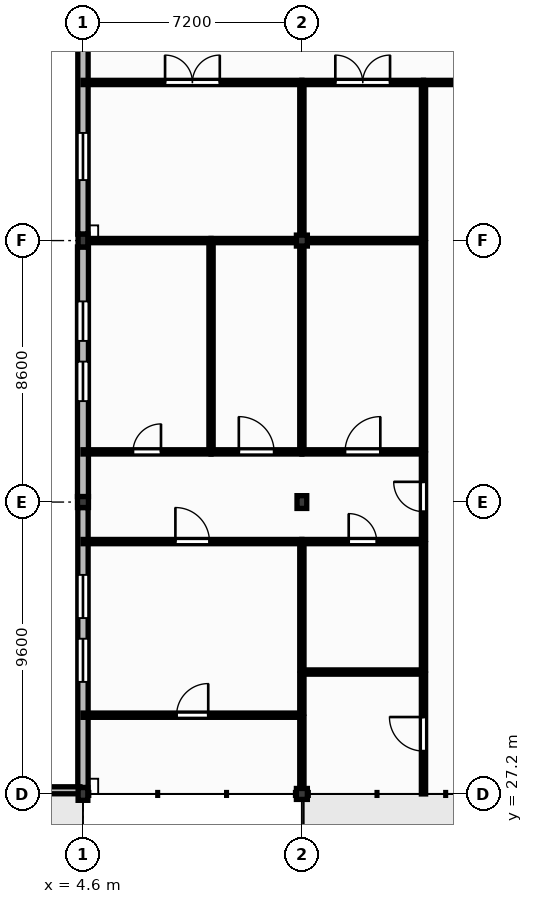
"""IFC4 building model, lengths in metres.
Left out: names, types, materials, properties, quantities, classifications, styles, units other than length and angle.
Written with IfcOpenShell. Run it as: python <this file> out.ifc"""

import sys

from ifc_helpers import new_model, si_unit, direction, frame, frame_2d, origin, origin_2d, place, context, subcontext, project, spatial, rectangle, extrude, element, fill, save


model = new_model("IFC4")
c1 = context("Model", 3, precision=1e-05, world=origin(), true_north=direction((0.0, 1.0)))
c2 = subcontext(c1, "Body", "Model", "MODEL_VIEW")
j1 = project(units=[si_unit("LENGTHUNIT", "METRE"), si_unit("PLANEANGLEUNIT", "RADIAN")], contexts=[c1])
p1 = place(None, origin())
s1 = spatial("IfcSite", under=j1, at=p1, CompositionType="ELEMENT")
p2 = place(p1, origin())
s2 = spatial("IfcBuilding", under=s1, at=p2, CompositionType="ELEMENT")
p3 = place(p2, frame((0.0, 0.0, 4.5)))
s3 = spatial("IfcBuildingStorey", under=s2, at=p3, CompositionType="ELEMENT", Elevation=4.5)
p4 = place(p3, frame((4.6, 27.2, 0.0), z_axis=(0.0, 0.0, 1.0), x_axis=(1.0, 0.0, 0.0)))
e1 = element("IfcColumn", 1, at=p4, inside=s3, PredefinedType="COLUMN", context=c2, shape_type="SweptSolid", body=[
    extrude(rectangle(XDim=0.32, YDim=0.42, at=origin_2d()), origin(), (0.0, 0.0, 1.0), 4.26),
])
p5 = place(p3, frame((4.6, 36.8, 0.0), z_axis=(0.0, 0.0, 1.0), x_axis=(1.0, 0.0, 0.0)))
e2 = element("IfcColumn", 2, at=p5, inside=s3, PredefinedType="COLUMN", context=c2, shape_type="SweptSolid", body=[
    extrude(rectangle(XDim=0.36, YDim=0.36, at=origin_2d()), origin(), (0.0, 0.0, 1.0), 4.26),
])
p6 = place(p3, frame((4.6, 45.4, 0.0), z_axis=(0.0, 0.0, 1.0), x_axis=(1.0, 0.0, 0.0)))
e3 = element("IfcColumn", 3, at=p6, inside=s3, PredefinedType="COLUMN", context=c2, shape_type="SweptSolid", body=[
    extrude(rectangle(XDim=0.32, YDim=0.42, at=origin_2d()), origin(), (0.0, 0.0, 1.0), 4.26),
])
p7 = place(p3, frame((11.8, 27.2, 0.0), z_axis=(0.0, 0.0, 1.0), x_axis=(1.0, 0.0, 0.0)))
e4 = element("IfcColumn", 4, at=p7, inside=s3, PredefinedType="COLUMN", context=c2, shape_type="SweptSolid", body=[
    extrude(rectangle(XDim=0.36, YDim=0.36, at=origin_2d()), origin(), (0.0, 0.0, 1.0), 4.26),
])
p8 = place(p3, frame((11.8, 36.8, 0.0), z_axis=(0.0, 0.0, 1.0), x_axis=(1.0, 0.0, 0.0)))
e5 = element("IfcColumn", 5, at=p8, inside=s3, PredefinedType="COLUMN", context=c2, shape_type="SweptSolid", body=[
    extrude(rectangle(XDim=0.32, YDim=0.42, at=origin_2d()), origin(), (0.0, 0.0, 1.0), 4.26),
])
p9 = place(p3, frame((11.8, 45.4, 0.0), z_axis=(0.0, 0.0, 1.0), x_axis=(1.0, 0.0, 0.0)))
e6 = element("IfcColumn", 6, at=p9, inside=s3, PredefinedType="COLUMN", context=c2, shape_type="SweptSolid", body=[
    extrude(rectangle(XDim=0.36, YDim=0.36, at=origin_2d()), origin(), (0.0, 0.0, 1.0), 4.26),
])
p10 = place(p3, frame((4.6, 27.41, 0.0), z_axis=(0.0, 0.0, 1.0), x_axis=(0.0, 1.0, 0.0)))
e7 = element("IfcWall", 7, at=p10, inside=s3, PredefinedType="SOLIDWALL", context=c2, shape_type="SweptSolid", body=[
    extrude(rectangle(XDim=9.21, YDim=0.34, at=frame_2d((4.605, 0.0))), origin(), (0.0, 0.0, 1.0), 3.8),
])
p11 = place(p10, frame((3.475, 0.0, 0.9)))
e8 = element("IfcOpeningElement", 8, at=p11, cuts=e7, PredefinedType="OPENING", context=c2, shape_type="SweptSolid", body=[
    extrude(rectangle(XDim=1.42, YDim=2.4, at=frame_2d((0.71, 1.2))), frame((0.0, 0.18, 0.0), z_axis=(0.0, -1.0, 0.0), x_axis=(1.0, 0.0, 0.0)), (0.0, 0.0, 1.0), 0.36),
])
p12 = place(p10, frame((5.575, 0.0, 0.9)))
e9 = element("IfcOpeningElement", 9, at=p12, cuts=e7, PredefinedType="OPENING", context=c2, shape_type="SweptSolid", body=[
    extrude(rectangle(XDim=1.42, YDim=2.4, at=frame_2d((0.71, 1.2))), frame((0.0, 0.18, 0.0), z_axis=(0.0, -1.0, 0.0), x_axis=(1.0, 0.0, 0.0)), (0.0, 0.0, 1.0), 0.36),
])
p13 = place(p3, frame((4.6, 36.98, 0.0), z_axis=(0.0, 0.0, 1.0), x_axis=(0.0, 1.0, 0.0)))
e10 = element("IfcWall", 10, at=p13, inside=s3, PredefinedType="SOLIDWALL", context=c2, shape_type="SweptSolid", body=[
    extrude(rectangle(XDim=8.21, YDim=0.36, at=frame_2d((4.105, 0.0))), origin(), (0.0, 0.0, 1.0), 3.8),
])
p14 = place(p13, frame((3.14, 0.0, 0.9)))
e11 = element("IfcOpeningElement", 11, at=p14, cuts=e10, PredefinedType="OPENING", context=c2, shape_type="SweptSolid", body=[
    extrude(rectangle(XDim=1.3, YDim=2.4, at=frame_2d((0.65, 1.2))), frame((0.0, 0.19, 0.0), z_axis=(0.0, -1.0, 0.0), x_axis=(1.0, 0.0, 0.0)), (0.0, 0.0, 1.0), 0.38),
])
p15 = place(p13, frame((5.12, 0.0, 0.9)))
e12 = element("IfcOpeningElement", 12, at=p15, cuts=e10, PredefinedType="OPENING", context=c2, shape_type="SweptSolid", body=[
    extrude(rectangle(XDim=1.3, YDim=2.4, at=frame_2d((0.65, 1.2))), frame((0.0, 0.19, 0.0), z_axis=(0.0, -1.0, 0.0), x_axis=(1.0, 0.0, 0.0)), (0.0, 0.0, 1.0), 0.38),
])
p16 = place(p3, frame((4.6, 45.61, 0.0), z_axis=(0.0, 0.0, 1.0), x_axis=(0.0, 1.0, 0.0)))
e13 = element("IfcWall", 13, at=p16, inside=s3, PredefinedType="SOLIDWALL", context=c2, shape_type="SweptSolid", body=[
    extrude(rectangle(XDim=6.81, YDim=0.34, at=frame_2d((3.405, 0.0))), origin(), (0.0, 0.0, 1.0), 3.8),
])
p17 = place(p16, frame((1.78, 0.0, 0.9)))
e14 = element("IfcOpeningElement", 14, at=p17, cuts=e13, PredefinedType="OPENING", context=c2, shape_type="SweptSolid", body=[
    extrude(rectangle(XDim=1.55, YDim=2.4, at=frame_2d((0.775, 1.2))), frame((0.0, 0.18, 0.0), z_axis=(0.0, -1.0, 0.0), x_axis=(1.0, 0.0, 0.0)), (0.0, 0.0, 1.0), 0.36),
])
p18 = place(p3, frame((2.78, 27.32, -0.05), z_axis=(0.0, 0.0, 1.0), x_axis=(1.0, 0.0, 0.0)))
e15 = element("IfcWall", 15, at=p18, inside=s3, PredefinedType="PARAPET", context=c2, shape_type="SweptSolid", body=[
    extrude(rectangle(XDim=1.72, YDim=0.23, at=frame_2d((0.86, 0.0))), origin(), (0.0, 0.0, 1.0), 0.7),
])
p19 = place(p3, frame((4.6, 29.79, 0.0), z_axis=(0.0, 0.0, 1.0), x_axis=(1.0, 0.0, 0.0)))
e16 = element("IfcWall", 16, at=p19, inside=s3, PredefinedType="PARTITIONING", context=c2, shape_type="SweptSolid", body=[
    extrude(rectangle(XDim=7.2, YDim=0.14, at=frame_2d((3.6, 0.0))), origin(), (0.0, 0.0, 1.0), 4.18),
])
p20 = place(p19, frame((3.08, 0.0, 0.0)))
e17 = element("IfcOpeningElement", 17, at=p20, cuts=e16, PredefinedType="OPENING", context=c2, shape_type="SweptSolid", body=[
    extrude(rectangle(XDim=1.04, YDim=2.1, at=frame_2d((0.52, 1.05))), frame((0.0, 0.08, 0.0), z_axis=(0.0, -1.0, 0.0), x_axis=(1.0, 0.0, 0.0)), (0.0, 0.0, 1.0), 0.16),
])
p21 = place(p3, frame((4.6, 35.5, 0.0), z_axis=(0.0, 0.0, 1.0), x_axis=(1.0, 0.0, 0.0)))
e18 = element("IfcWall", 18, at=p21, inside=s3, PredefinedType="PARTITIONING", context=c2, shape_type="SweptSolid", body=[
    extrude(rectangle(XDim=7.2, YDim=0.14, at=frame_2d((3.6, 0.0))), origin(), (0.0, 0.0, 1.0), 4.18),
])
p22 = place(p21, frame((3.04, 0.0, 0.0)))
e19 = element("IfcOpeningElement", 19, at=p22, cuts=e18, PredefinedType="OPENING", context=c2, shape_type="SweptSolid", body=[
    extrude(rectangle(XDim=1.12, YDim=2.15, at=frame_2d((0.56, 1.075))), frame((0.0, 0.08, 0.0), z_axis=(0.0, -1.0, 0.0), x_axis=(1.0, 0.0, 0.0)), (0.0, 0.0, 1.0), 0.16),
])
p23 = place(p3, frame((4.6, 38.45, 0.0), z_axis=(0.0, 0.0, 1.0), x_axis=(1.0, 0.0, 0.0)))
e20 = element("IfcWall", 20, at=p23, inside=s3, PredefinedType="PARTITIONING", context=c2, shape_type="SweptSolid", body=[
    extrude(rectangle(XDim=4.212, YDim=0.14, at=frame_2d((2.106, 0.0))), origin(), (0.0, 0.0, 1.0), 4.18),
])
p24 = place(p23, frame((1.646, 0.0, 0.0)))
e21 = element("IfcOpeningElement", 21, at=p24, cuts=e20, PredefinedType="OPENING", context=c2, shape_type="SweptSolid", body=[
    extrude(rectangle(XDim=0.92, YDim=2.1, at=frame_2d((0.46, 1.05))), frame((0.0, 0.08, 0.0), z_axis=(0.0, -1.0, 0.0), x_axis=(1.0, 0.0, 0.0)), (0.0, 0.0, 1.0), 0.16),
])
p25 = place(p3, frame((4.76, 45.4, 0.0), z_axis=(0.0, 0.0, 1.0), x_axis=(1.0, 0.0, 0.0)))
e22 = element("IfcWall", 22, at=p25, inside=s3, PredefinedType="PARTITIONING", context=c2, shape_type="SweptSolid", body=[
    extrude(rectangle(XDim=4.052, YDim=0.14, at=frame_2d((2.026, 0.0))), origin(), (0.0, 0.0, 1.0), 3.66),
])
p26 = place(p3, frame((4.6, 50.6, 0.0), z_axis=(0.0, 0.0, 1.0), x_axis=(1.0, 0.0, 0.0)))
e23 = element("IfcWall", 23, at=p26, inside=s3, PredefinedType="PARTITIONING", context=c2, shape_type="SweptSolid", body=[
    extrude(rectangle(XDim=7.2, YDim=0.14, at=frame_2d((3.6, 0.0))), origin(), (0.0, 0.0, 1.0), 4.18),
])
p27 = place(p26, frame((2.7, 0.0, 0.0)))
e24 = element("IfcOpeningElement", 24, at=p27, cuts=e23, PredefinedType="OPENING", context=c2, shape_type="SweptSolid", body=[
    extrude(rectangle(XDim=1.8, YDim=2.3, at=frame_2d((0.9, 1.15))), frame((0.0, 0.08, 0.0), z_axis=(0.0, -1.0, 0.0), x_axis=(1.0, 0.0, 0.0)), (0.0, 0.0, 1.0), 0.16),
])
p28 = place(p3, frame((8.812, 38.52, 0.0), z_axis=(0.0, 0.0, 1.0), x_axis=(0.0, 1.0, 0.0)))
e25 = element("IfcWall", 25, at=p28, inside=s3, PredefinedType="PARTITIONING", context=c2, shape_type="SweptSolid", body=[
    extrude(rectangle(XDim=6.81, YDim=0.14, at=frame_2d((3.405, 0.0))), origin(), (0.0, 0.0, 1.0), 4.18),
])
p29 = place(p3, frame((8.812, 38.45, 0.0), z_axis=(0.0, 0.0, 1.0), x_axis=(1.0, 0.0, 0.0)))
e26 = element("IfcWall", 26, at=p29, inside=s3, PredefinedType="PARTITIONING", context=c2, shape_type="SweptSolid", body=[
    extrude(rectangle(XDim=2.988, YDim=0.14, at=frame_2d((1.494, 0.0))), origin(), (0.0, 0.0, 1.0), 4.18),
])
p30 = place(p29, frame((0.914, 0.0, 0.0)))
e27 = element("IfcOpeningElement", 27, at=p30, cuts=e26, PredefinedType="OPENING", context=c2, shape_type="SweptSolid", body=[
    extrude(rectangle(XDim=1.16, YDim=2.1, at=frame_2d((0.58, 1.05))), frame((0.0, 0.08, 0.0), z_axis=(0.0, -1.0, 0.0), x_axis=(1.0, 0.0, 0.0)), (0.0, 0.0, 1.0), 0.16),
])
p31 = place(p3, frame((8.812, 45.4, 0.0), z_axis=(0.0, 0.0, 1.0), x_axis=(1.0, 0.0, 0.0)))
e28 = element("IfcWall", 28, at=p31, inside=s3, PredefinedType="PARTITIONING", context=c2, shape_type="SweptSolid", body=[
    extrude(rectangle(XDim=2.808, YDim=0.14, at=frame_2d((1.404, 0.0))), origin(), (0.0, 0.0, 1.0), 3.66),
])
p32 = place(p3, frame((11.8, 27.38, 0.0), z_axis=(0.0, 0.0, 1.0), x_axis=(0.0, 1.0, 0.0)))
e29 = element("IfcWall", 29, at=p32, inside=s3, PredefinedType="PARTITIONING", context=c2, shape_type="SweptSolid", body=[
    extrude(rectangle(XDim=2.34, YDim=0.14, at=frame_2d((1.17, 0.0))), origin(), (0.0, 0.0, 1.0), 3.62),
])
p33 = place(p3, frame((11.8, 29.86, 0.0), z_axis=(0.0, 0.0, 1.0), x_axis=(0.0, 1.0, 0.0)))
e30 = element("IfcWall", 30, at=p33, inside=s3, PredefinedType="PARTITIONING", context=c2, shape_type="SweptSolid", body=[
    extrude(rectangle(XDim=1.279, YDim=0.14, at=frame_2d((0.639, 0.0))), origin(), (0.0, 0.0, 1.0), 3.62),
])
p34 = place(p3, frame((11.8, 31.279, 0.0), z_axis=(0.0, 0.0, 1.0), x_axis=(0.0, 1.0, 0.0)))
e31 = element("IfcWall", 31, at=p34, inside=s3, PredefinedType="PARTITIONING", context=c2, shape_type="SweptSolid", body=[
    extrude(rectangle(XDim=4.151, YDim=0.14, at=frame_2d((2.075, 0.0))), origin(), (0.0, 0.0, 1.0), 3.62),
])
p35 = place(p3, frame((11.8, 31.209, 0.0), z_axis=(0.0, 0.0, 1.0), x_axis=(1.0, 0.0, 0.0)))
e32 = element("IfcWall", 32, at=p35, inside=s3, PredefinedType="PARTITIONING", context=c2, shape_type="SweptSolid", body=[
    extrude(rectangle(XDim=4.0, YDim=0.14, at=frame_2d((2.0, 0.0))), origin(), (0.0, 0.0, 1.0), 4.18),
])
p36 = place(p3, frame((11.8, 35.5, 0.0), z_axis=(0.0, 0.0, 1.0), x_axis=(1.0, 0.0, 0.0)))
e33 = element("IfcWall", 33, at=p36, inside=s3, PredefinedType="PARTITIONING", context=c2, shape_type="SweptSolid", body=[
    extrude(rectangle(XDim=4.0, YDim=0.14, at=frame_2d((2.0, 0.0))), origin(), (0.0, 0.0, 1.0), 4.18),
])
p37 = place(p36, frame((1.54, 0.0, 0.0)))
e34 = element("IfcOpeningElement", 34, at=p37, cuts=e33, PredefinedType="OPENING", context=c2, shape_type="SweptSolid", body=[
    extrude(rectangle(XDim=0.92, YDim=2.1, at=frame_2d((0.46, 1.05))), frame((0.0, 0.08, 0.0), z_axis=(0.0, -1.0, 0.0), x_axis=(1.0, 0.0, 0.0)), (0.0, 0.0, 1.0), 0.16),
])
p38 = place(p3, frame((11.8, 38.52, 0.0), z_axis=(0.0, 0.0, 1.0), x_axis=(0.0, 1.0, 0.0)))
e35 = element("IfcWall", 35, at=p38, inside=s3, PredefinedType="PARTITIONING", context=c2, shape_type="SweptSolid", body=[
    extrude(rectangle(XDim=6.7, YDim=0.14, at=frame_2d((3.35, 0.0))), origin(), (0.0, 0.0, 1.0), 3.62),
])
p39 = place(p3, frame((11.8, 38.45, 0.0), z_axis=(0.0, 0.0, 1.0), x_axis=(1.0, 0.0, 0.0)))
e36 = element("IfcWall", 36, at=p39, inside=s3, PredefinedType="PARTITIONING", context=c2, shape_type="SweptSolid", body=[
    extrude(rectangle(XDim=4.0, YDim=0.14, at=frame_2d((2.0, 0.0))), origin(), (0.0, 0.0, 1.0), 4.18),
])
p40 = place(p39, frame((1.42, 0.0, 0.0)))
e37 = element("IfcOpeningElement", 37, at=p40, cuts=e36, PredefinedType="OPENING", context=c2, shape_type="SweptSolid", body=[
    extrude(rectangle(XDim=1.16, YDim=2.1, at=frame_2d((0.58, 1.05))), frame((0.0, 0.08, 0.0), z_axis=(0.0, -1.0, 0.0), x_axis=(1.0, 0.0, 0.0)), (0.0, 0.0, 1.0), 0.16),
])
p41 = place(p3, frame((11.8, 45.58, 0.0), z_axis=(0.0, 0.0, 1.0), x_axis=(0.0, 1.0, 0.0)))
e38 = element("IfcWall", 38, at=p41, inside=s3, PredefinedType="PARTITIONING", context=c2, shape_type="SweptSolid", body=[
    extrude(rectangle(XDim=4.95, YDim=0.14, at=frame_2d((2.475, 0.0))), origin(), (0.0, 0.0, 1.0), 3.74),
])
p42 = place(p3, frame((11.98, 45.4, 0.0), z_axis=(0.0, 0.0, 1.0), x_axis=(1.0, 0.0, 0.0)))
e39 = element("IfcWall", 39, at=p42, inside=s3, PredefinedType="PARTITIONING", context=c2, shape_type="SweptSolid", body=[
    extrude(rectangle(XDim=3.82, YDim=0.14, at=frame_2d((1.91, 0.0))), origin(), (0.0, 0.0, 1.0), 3.62),
])
p43 = place(p3, frame((11.8, 50.6, 0.0), z_axis=(0.0, 0.0, 1.0), x_axis=(1.0, 0.0, 0.0)))
e40 = element("IfcWall", 40, at=p43, inside=s3, PredefinedType="PARTITIONING", context=c2, shape_type="SweptSolid", body=[
    extrude(rectangle(XDim=4.0, YDim=0.14, at=frame_2d((2.0, 0.0))), origin(), (0.0, 0.0, 1.0), 4.18),
])
p44 = place(p43, frame((1.1, 0.0, 0.0)))
e41 = element("IfcOpeningElement", 41, at=p44, cuts=e40, PredefinedType="OPENING", context=c2, shape_type="SweptSolid", body=[
    extrude(rectangle(XDim=1.8, YDim=2.3, at=frame_2d((0.9, 1.15))), frame((0.0, 0.08, 0.0), z_axis=(0.0, -1.0, 0.0), x_axis=(1.0, 0.0, 0.0)), (0.0, 0.0, 1.0), 0.16),
])
p45 = place(p3, frame((15.8, 27.2, 0.0), z_axis=(0.0, 0.0, 1.0), x_axis=(0.0, 1.0, 0.0)))
e42 = element("IfcWall", 42, at=p45, inside=s3, PredefinedType="PARTITIONING", context=c2, shape_type="SweptSolid", body=[
    extrude(rectangle(XDim=3.939, YDim=0.14, at=frame_2d((1.969, 0.0))), origin(), (0.0, 0.0, 1.0), 4.18),
])
p46 = place(p45, frame((1.409, 0.0, 0.0)))
e43 = element("IfcOpeningElement", 43, at=p46, cuts=e42, PredefinedType="OPENING", context=c2, shape_type="SweptSolid", body=[
    extrude(rectangle(XDim=1.12, YDim=2.15, at=frame_2d((0.56, 1.075))), frame((0.0, 0.08, 0.0), z_axis=(0.0, -1.0, 0.0), x_axis=(1.0, 0.0, 0.0)), (0.0, 0.0, 1.0), 0.16),
])
p47 = place(p3, frame((15.8, 31.279, 0.0), z_axis=(0.0, 0.0, 1.0), x_axis=(0.0, 1.0, 0.0)))
e44 = element("IfcWall", 44, at=p47, inside=s3, PredefinedType="PARTITIONING", context=c2, shape_type="SweptSolid", body=[
    extrude(rectangle(XDim=4.151, YDim=0.14, at=frame_2d((2.075, 0.0))), origin(), (0.0, 0.0, 1.0), 4.18),
])
p48 = place(p3, frame((15.8, 35.57, 0.0), z_axis=(0.0, 0.0, 1.0), x_axis=(0.0, 1.0, 0.0)))
e45 = element("IfcWall", 45, at=p48, inside=s3, PredefinedType="PARTITIONING", context=c2, shape_type="SweptSolid", body=[
    extrude(rectangle(XDim=2.81, YDim=0.14, at=frame_2d((1.405, 0.0))), origin(), (0.0, 0.0, 1.0), 4.18),
])
p49 = place(p48, frame((0.915, 0.0, 0.0)))
e46 = element("IfcOpeningElement", 46, at=p49, cuts=e45, PredefinedType="OPENING", context=c2, shape_type="SweptSolid", body=[
    extrude(rectangle(XDim=0.98, YDim=2.15, at=frame_2d((0.49, 1.075))), frame((0.0, 0.08, 0.0), z_axis=(0.0, -1.0, 0.0), x_axis=(1.0, 0.0, 0.0)), (0.0, 0.0, 1.0), 0.16),
])
p50 = place(p3, frame((15.8, 38.52, 0.0), z_axis=(0.0, 0.0, 1.0), x_axis=(0.0, 1.0, 0.0)))
e47 = element("IfcWall", 47, at=p50, inside=s3, PredefinedType="PARTITIONING", context=c2, shape_type="SweptSolid", body=[
    extrude(rectangle(XDim=6.81, YDim=0.14, at=frame_2d((3.405, 0.0))), origin(), (0.0, 0.0, 1.0), 4.18),
])
p51 = place(p3, frame((15.8, 45.47, 0.0), z_axis=(0.0, 0.0, 1.0), x_axis=(0.0, 1.0, 0.0)))
e48 = element("IfcWall", 48, at=p51, inside=s3, PredefinedType="PARTITIONING", context=c2, shape_type="SweptSolid", body=[
    extrude(rectangle(XDim=5.06, YDim=0.14, at=frame_2d((2.53, 0.0))), origin(), (0.0, 0.0, 1.0), 4.18),
])
p52 = place(p3, frame((15.8, 50.6, 0.0), z_axis=(0.0, 0.0, 1.0), x_axis=(1.0, 0.0, 0.0)))
e49 = element("IfcWall", 49, at=p52, inside=s3, PredefinedType="PARTITIONING", context=c2, shape_type="SweptSolid", body=[
    extrude(rectangle(XDim=3.2, YDim=0.14, at=frame_2d((1.6, 0.0))), origin(), (0.0, 0.0, 1.0), 4.18),
])
p53 = place(p52, frame((1.08, 0.0, 0.0)))
e50 = element("IfcOpeningElement", 50, at=p53, cuts=e49, PredefinedType="OPENING", context=c2, shape_type="SweptSolid", body=[
    extrude(rectangle(XDim=1.04, YDim=2.1, at=frame_2d((0.52, 1.05))), frame((0.0, 0.08, 0.0), z_axis=(0.0, -1.0, 0.0), x_axis=(1.0, 0.0, 0.0)), (0.0, 0.0, 1.0), 0.16),
])
p54 = place(p11, origin())
e51 = element("IfcWindow", 51, at=p54, inside=s3, PartitioningType="SINGLE_PANEL", PredefinedType="WINDOW", context=c2, shape_type="SweptSolid", body=[
    extrude(rectangle(XDim=1.42, YDim=2.4, at=frame_2d((0.71, 1.2))), frame((0.0, 0.03, 0.0), z_axis=(0.0, -1.0, 0.0), x_axis=(1.0, 0.0, 0.0)), (0.0, 0.0, 1.0), 0.06),
])
fill(e8, e51)
p55 = place(p12, origin())
e52 = element("IfcWindow", 52, at=p55, inside=s3, PartitioningType="SINGLE_PANEL", PredefinedType="WINDOW", context=c2, shape_type="SweptSolid", body=[
    extrude(rectangle(XDim=1.42, YDim=2.4, at=frame_2d((0.71, 1.2))), frame((0.0, 0.03, 0.0), z_axis=(0.0, -1.0, 0.0), x_axis=(1.0, 0.0, 0.0)), (0.0, 0.0, 1.0), 0.06),
])
fill(e9, e52)
p56 = place(p14, origin())
e53 = element("IfcWindow", 53, at=p56, inside=s3, PartitioningType="SINGLE_PANEL", PredefinedType="WINDOW", context=c2, shape_type="SweptSolid", body=[
    extrude(rectangle(XDim=1.3, YDim=2.4, at=frame_2d((0.65, 1.2))), frame((0.0, 0.03, 0.0), z_axis=(0.0, -1.0, 0.0), x_axis=(1.0, 0.0, 0.0)), (0.0, 0.0, 1.0), 0.06),
])
fill(e11, e53)
p57 = place(p15, origin())
e54 = element("IfcWindow", 54, at=p57, inside=s3, PartitioningType="SINGLE_PANEL", PredefinedType="WINDOW", context=c2, shape_type="SweptSolid", body=[
    extrude(rectangle(XDim=1.3, YDim=2.4, at=frame_2d((0.65, 1.2))), frame((0.0, 0.03, 0.0), z_axis=(0.0, -1.0, 0.0), x_axis=(1.0, 0.0, 0.0)), (0.0, 0.0, 1.0), 0.06),
])
fill(e12, e54)
p58 = place(p17, origin())
e55 = element("IfcWindow", 55, at=p58, inside=s3, PartitioningType="DOUBLE_PANEL_VERTICAL", PredefinedType="WINDOW", context=c2, shape_type="SweptSolid", body=[
    extrude(rectangle(XDim=1.55, YDim=2.4, at=frame_2d((0.775, 1.2))), frame((0.0, 0.03, 0.0), z_axis=(0.0, -1.0, 0.0), x_axis=(1.0, 0.0, 0.0)), (0.0, 0.0, 1.0), 0.06),
])
fill(e14, e55)
p59 = place(p49, origin())
e56 = element("IfcDoor", 56, at=p59, inside=s3, OperationType="SINGLE_SWING_RIGHT", PredefinedType="DOOR", context=c2, shape_type="SweptSolid", body=[
    extrude(rectangle(XDim=0.98, YDim=2.15, at=frame_2d((0.49, 1.075))), frame((0.0, 0.025, 0.0), z_axis=(0.0, -1.0, 0.0), x_axis=(1.0, 0.0, 0.0)), (0.0, 0.0, 1.0), 0.05),
])
fill(e46, e56)
p60 = place(p22, origin())
e57 = element("IfcDoor", 57, at=p60, inside=s3, OperationType="SINGLE_SWING_LEFT", PredefinedType="DOOR", context=c2, shape_type="SweptSolid", body=[
    extrude(rectangle(XDim=1.12, YDim=2.15, at=frame_2d((0.56, 1.075))), frame((0.0, 0.025, 0.0), z_axis=(0.0, -1.0, 0.0), x_axis=(1.0, 0.0, 0.0)), (0.0, 0.0, 1.0), 0.05),
])
fill(e19, e57)
p61 = place(p24, origin())
e58 = element("IfcDoor", 58, at=p61, inside=s3, OperationType="SINGLE_SWING_RIGHT", PredefinedType="DOOR", context=c2, shape_type="SweptSolid", body=[
    extrude(rectangle(XDim=0.92, YDim=2.1, at=frame_2d((0.46, 1.05))), frame((0.0, 0.025, 0.0), z_axis=(0.0, -1.0, 0.0), x_axis=(1.0, 0.0, 0.0)), (0.0, 0.0, 1.0), 0.05),
])
fill(e21, e58)
p62 = place(p30, origin())
e59 = element("IfcDoor", 59, at=p62, inside=s3, OperationType="SINGLE_SWING_LEFT", PredefinedType="DOOR", context=c2, shape_type="SweptSolid", body=[
    extrude(rectangle(XDim=1.16, YDim=2.1, at=frame_2d((0.58, 1.05))), frame((0.0, 0.025, 0.0), z_axis=(0.0, -1.0, 0.0), x_axis=(1.0, 0.0, 0.0)), (0.0, 0.0, 1.0), 0.05),
])
fill(e27, e59)
p63 = place(p27, origin())
e60 = element("IfcDoor", 60, at=p63, inside=s3, OperationType="DOUBLE_DOOR_SINGLE_SWING", PredefinedType="DOOR", context=c2, shape_type="SweptSolid", body=[
    extrude(rectangle(XDim=1.8, YDim=2.3, at=frame_2d((0.9, 1.15))), frame((0.0, 0.025, 0.0), z_axis=(0.0, -1.0, 0.0), x_axis=(1.0, 0.0, 0.0)), (0.0, 0.0, 1.0), 0.05),
])
fill(e24, e60)
p64 = place(p46, origin())
e61 = element("IfcDoor", 61, at=p64, inside=s3, OperationType="SINGLE_SWING_RIGHT", PredefinedType="DOOR", context=c2, shape_type="SweptSolid", body=[
    extrude(rectangle(XDim=1.12, YDim=2.15, at=frame_2d((0.56, 1.075))), frame((0.0, 0.025, 0.0), z_axis=(0.0, -1.0, 0.0), x_axis=(1.0, 0.0, 0.0)), (0.0, 0.0, 1.0), 0.05),
])
fill(e43, e61)
p65 = place(p37, origin())
e62 = element("IfcDoor", 62, at=p65, inside=s3, OperationType="SINGLE_SWING_LEFT", PredefinedType="DOOR", context=c2, shape_type="SweptSolid", body=[
    extrude(rectangle(XDim=0.92, YDim=2.1, at=frame_2d((0.46, 1.05))), frame((0.0, 0.025, 0.0), z_axis=(0.0, -1.0, 0.0), x_axis=(1.0, 0.0, 0.0)), (0.0, 0.0, 1.0), 0.05),
])
fill(e34, e62)
p66 = place(p40, origin())
e63 = element("IfcDoor", 63, at=p66, inside=s3, OperationType="SINGLE_SWING_RIGHT", PredefinedType="DOOR", context=c2, shape_type="SweptSolid", body=[
    extrude(rectangle(XDim=1.16, YDim=2.1, at=frame_2d((0.58, 1.05))), frame((0.0, 0.025, 0.0), z_axis=(0.0, -1.0, 0.0), x_axis=(1.0, 0.0, 0.0)), (0.0, 0.0, 1.0), 0.05),
])
fill(e37, e63)
p67 = place(p44, origin())
e64 = element("IfcDoor", 64, at=p67, inside=s3, OperationType="DOUBLE_DOOR_SINGLE_SWING", PredefinedType="DOOR", context=c2, shape_type="SweptSolid", body=[
    extrude(rectangle(XDim=1.8, YDim=2.3, at=frame_2d((0.9, 1.15))), frame((0.0, 0.025, 0.0), z_axis=(0.0, -1.0, 0.0), x_axis=(1.0, 0.0, 0.0)), (0.0, 0.0, 1.0), 0.05),
])
fill(e41, e64)
p68 = place(p20, origin())
e65 = element("IfcDoor", 65, at=p68, inside=s3, OperationType="SINGLE_SWING_RIGHT", PredefinedType="DOOR", context=c2, shape_type="SweptSolid", body=[
    extrude(rectangle(XDim=1.04, YDim=2.1, at=frame_2d((0.52, 1.05))), frame((0.0, 0.025, 0.0), z_axis=(0.0, -1.0, 0.0), x_axis=(1.0, 0.0, 0.0)), (0.0, 0.0, 1.0), 0.05),
])
fill(e17, e65)
save(model, sys.argv[1])
